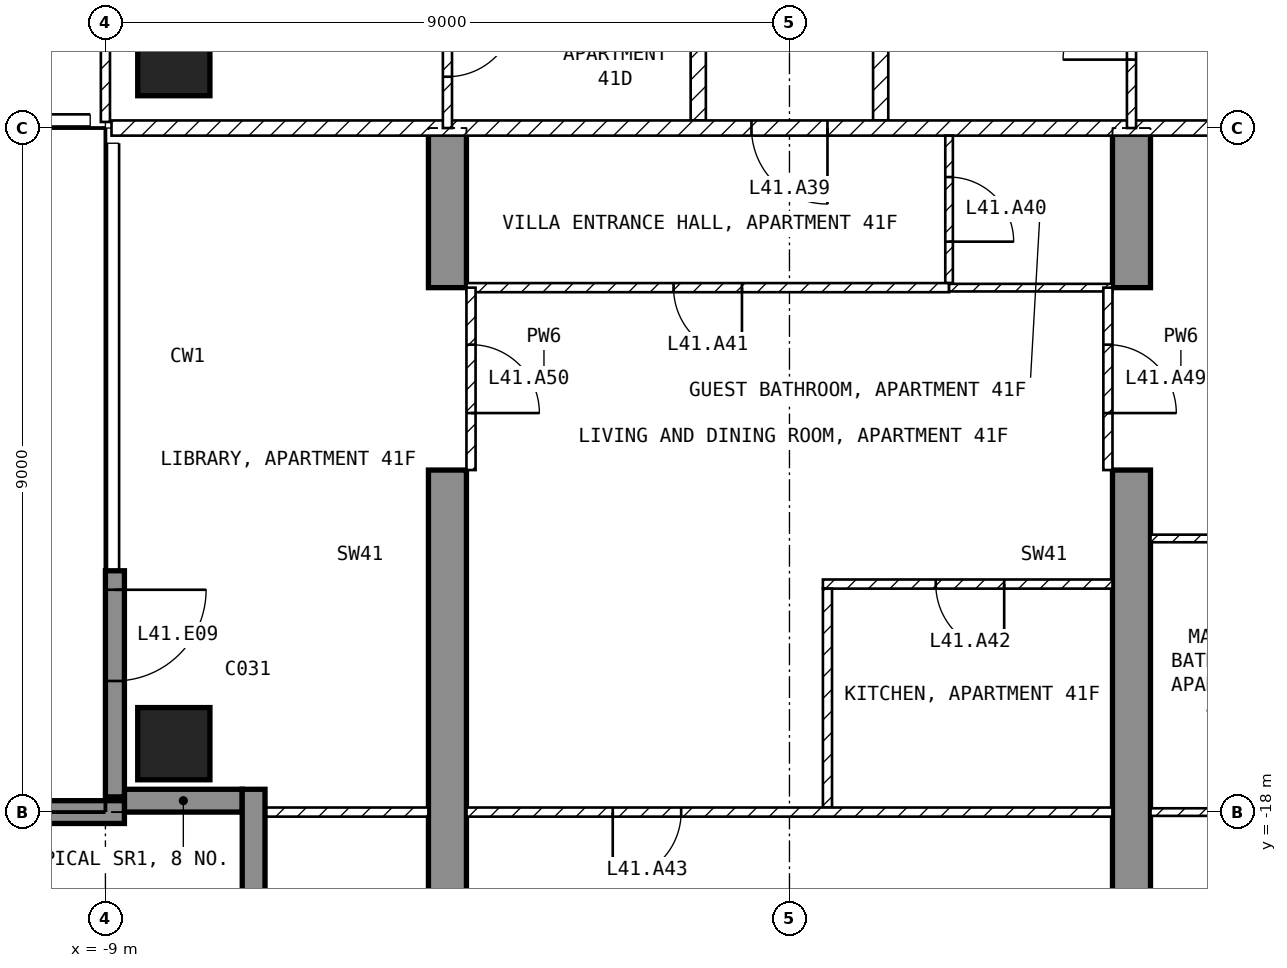
"""IFC4 building model, lengths in metres.
Left out: names, types, materials, properties, quantities, classifications, styles, units other than length and angle.
Written with IfcOpenShell. Run it as: python <this file> out.ifc"""

import sys

from ifc_helpers import new_model, si_unit, direction, frame, frame_2d, origin, origin_2d, place, context, subcontext, project, spatial, polyline, rectangle, outline, extrude, element, fill, save


model = new_model("IFC4")
c1 = context("Model", 3, precision=1e-05, world=origin(), true_north=direction((0.0, 1.0)))
c2 = subcontext(c1, "Body", "Model", "MODEL_VIEW")
j1 = project(units=[si_unit("LENGTHUNIT", "METRE"), si_unit("PLANEANGLEUNIT", "RADIAN")], contexts=[c1])
p1 = place(None, origin())
s1 = spatial("IfcSite", under=j1, at=p1, CompositionType="ELEMENT")
p2 = place(p1, origin())
s2 = spatial("IfcBuilding", under=s1, at=p2, CompositionType="ELEMENT")
p3 = place(p2, frame((0.0, 0.0, 170.1)))
s3 = spatial("IfcBuildingStorey", under=s2, at=p3, CompositionType="ELEMENT", Elevation=170.1)
for number, where, z_axis, x_axis in (
    (1, (-8.1, -17.1, -0.25), (0.0, 0.0, 1.0), (1.0, 0.0, 0.0)),
    (2, (-8.1, -8.1, -0.25), (0.0, 0.0, 1.0), (1.0, 0.0, 0.0)),
):
    element("IfcColumn", number, at=place(p3, frame(where, z_axis=z_axis, x_axis=x_axis)), inside=s3, PredefinedType="COLUMN", context=c2, shape_type="SweptSolid", body=[
        extrude(rectangle(XDim=0.95, YDim=0.95, at=origin_2d()), origin(), (0.0, 0.0, 1.0), 3.5),
    ])
for number, where, z_axis, x_axis in (
    (3, (-4.75, -20.225, -0.25), (1.0, 0.0, 0.0), (0.0, 1.0, 0.0)),
    (4, (4.25, -20.225, -0.25), (1.0, 0.0, 0.0), (0.0, 1.0, 0.0)),
):
    element("IfcWall", number, at=place(p3, frame(where, z_axis=z_axis, x_axis=x_axis)), inside=s3, PredefinedType="SHEAR", context=c2, shape_type="SweptSolid", body=[
        extrude(outline(polyline([(0.0, 0.0), (6.725, 0.0), (6.725, 2.65), (9.125, 2.65), (9.125, 0.0), (11.225, 0.0), (11.225, 3.5), (0.0, 3.5), (0.0, 0.0)])), origin(), (0.0, 0.0, 1.0), 0.5),
    ])
p4 = place(p3, frame((-8.875, -14.825, 0.0), z_axis=(0.0, 0.0, 1.0), x_axis=(0.0, -1.0, 0.0)))
e5 = element("IfcWall", 5, at=p4, inside=s3, PredefinedType="SOLIDWALL", context=c2, shape_type="SweptSolid", body=[
    extrude(rectangle(XDim=2.975, YDim=0.25, at=frame_2d((1.488, 0.0))), origin(), (0.0, 0.0, 1.0), 3.25),
])
p5 = place(p4, frame((0.25, 0.0, 0.0)))
e6 = element("IfcOpeningElement", 6, at=p5, cuts=e5, PredefinedType="OPENING", context=c2, shape_type="SweptSolid", body=[
    extrude(rectangle(XDim=1.2, YDim=2.4, at=frame_2d((0.6, 1.2))), frame((0.0, 0.135, 0.0), z_axis=(0.0, -1.0, 0.0), x_axis=(1.0, 0.0, 0.0)), (0.0, 0.0, 1.0), 0.27),
])
p6 = place(p3, frame((-8.75, -17.85, 0.0), z_axis=(0.0, 0.0, 1.0), x_axis=(1.0, 0.0, 0.0)))
e7 = element("IfcWall", 7, at=p6, inside=s3, PredefinedType="SOLIDWALL", context=c2, shape_type="SweptSolid", body=[
    extrude(rectangle(XDim=1.55, YDim=0.3, at=frame_2d((0.775, 0.0))), origin(), (0.0, 0.0, 1.0), 3.25),
])
p7 = place(p3, frame((-7.05, -17.7, 0.0), z_axis=(0.0, 0.0, 1.0), x_axis=(0.0, -1.0, 0.0)))
e8 = element("IfcWall", 8, at=p7, inside=s3, PredefinedType="SOLIDWALL", context=c2, shape_type="SweptSolid", body=[
    extrude(rectangle(XDim=1.8, YDim=0.3, at=frame_2d((0.9, 0.0))), origin(), (0.0, 0.0, 1.0), 3.25),
])
p8 = place(p3, frame((-8.75, -18.0, 0.0), z_axis=(0.0, 0.0, 1.0), x_axis=(-1.0, 0.0, 0.0)))
e9 = element("IfcWall", 9, at=p8, inside=s3, PredefinedType="SOLIDWALL", context=c2, shape_type="SweptSolid", body=[
    extrude(rectangle(XDim=2.95, YDim=0.3, at=frame_2d((1.475, 0.0))), origin(), (0.0, 0.0, 1.0), 3.25),
])
for number, where, z_axis, x_axis in (
    (10, (1.2, -4.6, 0.0), (0.0, 0.0, 1.0), (0.0, -1.0, 0.0)),
    (11, (-1.2, -8.9, 0.0), (0.0, 0.0, 1.0), (0.0, 1.0, 0.0)),
):
    element("IfcWall", number, at=place(p3, frame(where, z_axis=z_axis, x_axis=x_axis)), inside=s3, PredefinedType="PARTITIONING", context=c2, shape_type="SweptSolid", body=[
        extrude(rectangle(XDim=4.3, YDim=0.2, at=frame_2d((2.15, 0.0))), origin(), (0.0, 0.0, 1.0), 3.25),
    ])
p9 = place(p3, frame((8.92, -9.0, 0.0), z_axis=(0.0, 0.0, 1.0), x_axis=(-1.0, 0.0, 0.0)))
e12 = element("IfcWall", 12, at=p9, inside=s3, PredefinedType="PARTITIONING", context=c2, shape_type="SweptSolid", body=[
    extrude(rectangle(XDim=17.84, YDim=0.2, at=frame_2d((8.92, 0.0))), origin(), (0.0, 0.0, 1.0), 3.25),
])
p10 = place(p9, frame((8.42, 0.0, 0.0)))
e13 = element("IfcOpeningElement", 13, at=p10, cuts=e12, PredefinedType="OPENING", context=c2, shape_type="SweptSolid", body=[
    extrude(rectangle(XDim=1.0, YDim=2.1, at=frame_2d((0.5, 1.05))), frame((0.0, 0.11, 0.0), z_axis=(0.0, -1.0, 0.0), x_axis=(1.0, 0.0, 0.0)), (0.0, 0.0, 1.0), 0.22),
])
p11 = place(p3, frame((4.5, -9.0, 0.0), z_axis=(0.0, 0.0, 1.0), x_axis=(0.0, 1.0, 0.0)))
e14 = element("IfcWall", 14, at=p11, inside=s3, PredefinedType="PARTITIONING", context=c2, shape_type="SweptSolid", body=[
    extrude(rectangle(XDim=2.7, YDim=0.12, at=frame_2d((1.35, 0.0))), origin(), (0.0, 0.0, 1.0), 3.25),
])
p12 = place(p11, frame((0.9, 0.0, 0.0)))
e15 = element("IfcOpeningElement", 15, at=p12, cuts=e14, PredefinedType="OPENING", context=c2, shape_type="SweptSolid", body=[
    extrude(rectangle(XDim=0.9, YDim=2.1, at=frame_2d((0.45, 1.05))), frame((0.0, 0.07, 0.0), z_axis=(0.0, -1.0, 0.0), x_axis=(1.0, 0.0, 0.0)), (0.0, 0.0, 1.0), 0.14),
])
p13 = place(p3, frame((-9.0, -1.3, 0.0), z_axis=(0.0, 0.0, 1.0), x_axis=(0.0, -1.0, 0.0)))
e16 = element("IfcWall", 16, at=p13, inside=s3, PredefinedType="PARTITIONING", context=c2, shape_type="SweptSolid", body=[
    extrude(rectangle(XDim=7.62, YDim=0.12, at=frame_2d((3.81, 0.0))), origin(), (0.0, 0.0, 1.0), 3.25),
])
p14 = place(p13, frame((4.3, 0.0, 0.0)))
e17 = element("IfcOpeningElement", 17, at=p14, cuts=e16, PredefinedType="OPENING", context=c2, shape_type="SweptSolid", body=[
    extrude(rectangle(XDim=0.9, YDim=2.1, at=frame_2d((0.45, 1.05))), frame((0.0, 0.07, 0.0), z_axis=(0.0, -1.0, 0.0), x_axis=(1.0, 0.0, 0.0)), (0.0, 0.0, 1.0), 0.14),
])
p15 = place(p3, frame((-4.5, -6.75, 0.0), z_axis=(0.0, 0.0, 1.0), x_axis=(0.0, -1.0, 0.0)))
e18 = element("IfcWall", 18, at=p15, inside=s3, PredefinedType="PARTITIONING", context=c2, shape_type="SweptSolid", body=[
    extrude(rectangle(XDim=2.25, YDim=0.12, at=frame_2d((1.125, 0.0))), origin(), (0.0, 0.0, 1.0), 3.25),
])
p16 = place(p15, frame((0.675, 0.0, 0.0)))
e19 = element("IfcOpeningElement", 19, at=p16, cuts=e18, PredefinedType="OPENING", context=c2, shape_type="SweptSolid", body=[
    extrude(rectangle(XDim=0.9, YDim=2.1, at=frame_2d((0.45, 1.05))), frame((0.0, 0.07, 0.0), z_axis=(0.0, -1.0, 0.0), x_axis=(1.0, 0.0, 0.0)), (0.0, 0.0, 1.0), 0.14),
])
p17 = place(p3, frame((2.1, -9.1, 0.0), z_axis=(0.0, 0.0, 1.0), x_axis=(0.0, -1.0, 0.0)))
e20 = element("IfcWall", 20, at=p17, inside=s3, PredefinedType="PARTITIONING", context=c2, shape_type="SweptSolid", body=[
    extrude(rectangle(XDim=1.94, YDim=0.1, at=frame_2d((0.97, 0.0))), origin(), (0.0, 0.0, 1.0), 3.25),
])
p18 = place(p17, frame((0.545, 0.0, 0.0)))
e21 = element("IfcOpeningElement", 21, at=p18, cuts=e20, PredefinedType="OPENING", context=c2, shape_type="SweptSolid", body=[
    extrude(rectangle(XDim=0.85, YDim=2.1, at=frame_2d((0.425, 1.05))), frame((0.0, 0.06, 0.0), z_axis=(0.0, -1.0, 0.0), x_axis=(1.0, 0.0, 0.0)), (0.0, 0.0, 1.0), 0.12),
])
p19 = place(p3, frame((2.1, -11.1, 0.0), z_axis=(0.0, 0.0, 1.0), x_axis=(-1.0, 0.0, 0.0)))
e22 = element("IfcWall", 22, at=p19, inside=s3, PredefinedType="PARTITIONING", context=c2, shape_type="SweptSolid", body=[
    extrude(rectangle(XDim=6.35, YDim=0.12, at=frame_2d((3.175, 0.0))), origin(), (0.0, 0.0, 1.0), 3.25),
])
p20 = place(p19, frame((2.725, 0.0, 0.0)))
e23 = element("IfcOpeningElement", 23, at=p20, cuts=e22, PredefinedType="OPENING", context=c2, shape_type="SweptSolid", body=[
    extrude(rectangle(XDim=0.9, YDim=2.1, at=frame_2d((0.45, 1.05))), frame((0.0, 0.07, 0.0), z_axis=(0.0, -1.0, 0.0), x_axis=(1.0, 0.0, 0.0)), (0.0, 0.0, 1.0), 0.14),
])
p21 = place(p3, frame((4.25, -11.1, 0.0), z_axis=(0.0, 0.0, 1.0), x_axis=(-1.0, 0.0, 0.0)))
e24 = element("IfcWall", 24, at=p21, inside=s3, PredefinedType="PARTITIONING", context=c2, shape_type="SweptSolid", body=[
    extrude(rectangle(XDim=2.15, YDim=0.1, at=frame_2d((1.075, 0.0))), origin(), (0.0, 0.0, 1.0), 3.25),
])
p22 = place(p3, frame((4.25, -15.0, 0.0), z_axis=(0.0, 0.0, 1.0), x_axis=(-1.0, 0.0, 0.0)))
e25 = element("IfcWall", 25, at=p22, inside=s3, PredefinedType="PARTITIONING", context=c2, shape_type="SweptSolid", body=[
    extrude(rectangle(XDim=3.81, YDim=0.12, at=frame_2d((1.905, 0.0))), origin(), (0.0, 0.0, 1.0), 3.25),
])
p23 = place(p22, frame((1.425, 0.0, 0.0)))
e26 = element("IfcOpeningElement", 26, at=p23, cuts=e25, PredefinedType="OPENING", context=c2, shape_type="SweptSolid", body=[
    extrude(rectangle(XDim=0.9, YDim=2.1, at=frame_2d((0.45, 1.05))), frame((0.0, 0.07, 0.0), z_axis=(0.0, -1.0, 0.0), x_axis=(1.0, 0.0, 0.0)), (0.0, 0.0, 1.0), 0.14),
])
p24 = place(p3, frame((0.5, -15.06, 0.0), z_axis=(0.0, 0.0, 1.0), x_axis=(0.0, -1.0, 0.0)))
e27 = element("IfcWall", 27, at=p24, inside=s3, PredefinedType="PARTITIONING", context=c2, shape_type="SweptSolid", body=[
    extrude(rectangle(XDim=2.88, YDim=0.12, at=frame_2d((1.44, 0.0))), origin(), (0.0, 0.0, 1.0), 3.25),
])
p25 = place(p3, frame((4.25, -18.0, 0.0), z_axis=(0.0, 0.0, 1.0), x_axis=(-1.0, 0.0, 0.0)))
e28 = element("IfcWall", 28, at=p25, inside=s3, PredefinedType="PARTITIONING", context=c2, shape_type="SweptSolid", body=[
    extrude(rectangle(XDim=8.5, YDim=0.12, at=frame_2d((4.25, 0.0))), origin(), (0.0, 0.0, 1.0), 3.25),
])
p26 = place(p25, frame((5.675, 0.0, 0.0)))
e29 = element("IfcOpeningElement", 29, at=p26, cuts=e28, PredefinedType="OPENING", context=c2, shape_type="SweptSolid", body=[
    extrude(rectangle(XDim=0.9, YDim=2.1, at=frame_2d((0.45, 1.05))), frame((0.0, 0.07, 0.0), z_axis=(0.0, -1.0, 0.0), x_axis=(1.0, 0.0, 0.0)), (0.0, 0.0, 1.0), 0.14),
])
p27 = place(p3, frame((6.95, -14.4, 0.0), z_axis=(0.0, 0.0, 1.0), x_axis=(-1.0, 0.0, 0.0)))
e30 = element("IfcWall", 30, at=p27, inside=s3, PredefinedType="PARTITIONING", context=c2, shape_type="SweptSolid", body=[
    extrude(rectangle(XDim=2.2, YDim=0.1, at=frame_2d((1.1, 0.0))), origin(), (0.0, 0.0, 1.0), 3.25),
])
p28 = place(p3, frame((7.12, -18.0, 0.0), z_axis=(0.0, 0.0, 1.0), x_axis=(-1.0, 0.0, 0.0)))
e31 = element("IfcWall", 31, at=p28, inside=s3, PredefinedType="PARTITIONING", context=c2, shape_type="SweptSolid", body=[
    extrude(rectangle(XDim=2.37, YDim=0.1, at=frame_2d((1.185, 0.0))), origin(), (0.0, 0.0, 1.0), 3.25),
])
p29 = place(p3, frame((-4.75, -18.0, 0.0), z_axis=(0.0, 0.0, 1.0), x_axis=(-1.0, 0.0, 0.0)))
e32 = element("IfcWall", 32, at=p29, inside=s3, PredefinedType="PARTITIONING", context=c2, shape_type="SweptSolid", body=[
    extrude(rectangle(XDim=2.37, YDim=0.12, at=frame_2d((1.185, 0.0))), origin(), (0.0, 0.0, 1.0), 3.25),
])
p30 = place(p3, frame((4.19, -11.1, 0.0), z_axis=(0.0, 0.0, 1.0), x_axis=(0.0, -1.0, 0.0)))
e33 = element("IfcWall", 33, at=p30, inside=s3, PredefinedType="PARTITIONING", context=c2, shape_type="SweptSolid", body=[
    extrude(rectangle(XDim=2.4, YDim=0.12, at=frame_2d((1.2, 0.0))), origin(), (0.0, 0.0, 1.0), 2.4),
])
p31 = place(p30, frame((0.75, 0.0, 0.0)))
e34 = element("IfcOpeningElement", 34, at=p31, cuts=e33, PredefinedType="OPENING", context=c2, shape_type="SweptSolid", body=[
    extrude(rectangle(XDim=0.9, YDim=2.1, at=frame_2d((0.45, 1.05))), frame((0.0, 0.07, 0.0), z_axis=(0.0, -1.0, 0.0), x_axis=(1.0, 0.0, 0.0)), (0.0, 0.0, 1.0), 0.14),
])
p32 = place(p3, frame((-4.19, -11.1, 0.0), z_axis=(0.0, 0.0, 1.0), x_axis=(0.0, -1.0, 0.0)))
e35 = element("IfcWall", 35, at=p32, inside=s3, PredefinedType="PARTITIONING", context=c2, shape_type="SweptSolid", body=[
    extrude(rectangle(XDim=2.4, YDim=0.12, at=frame_2d((1.2, 0.0))), origin(), (0.0, 0.0, 1.0), 2.4),
])
p33 = place(p32, frame((0.75, 0.0, 0.0)))
e36 = element("IfcOpeningElement", 36, at=p33, cuts=e35, PredefinedType="OPENING", context=c2, shape_type="SweptSolid", body=[
    extrude(rectangle(XDim=0.9, YDim=2.1, at=frame_2d((0.45, 1.05))), frame((0.0, 0.07, 0.0), z_axis=(0.0, -1.0, 0.0), x_axis=(1.0, 0.0, 0.0)), (0.0, 0.0, 1.0), 0.14),
])
p34 = place(p5, origin())
e37 = element("IfcDoor", 37, at=p34, inside=s3, OperationType="SINGLE_SWING_LEFT", PredefinedType="DOOR", context=c2, shape_type="SweptSolid", body=[
    extrude(rectangle(XDim=1.2, YDim=2.4, at=frame_2d((0.6, 1.2))), frame((0.0, 0.025, 0.0), z_axis=(0.0, -1.0, 0.0), x_axis=(1.0, 0.0, 0.0)), (0.0, 0.0, 1.0), 0.05),
])
fill(e6, e37)
p35 = place(p12, origin())
e38 = element("IfcDoor", 38, at=p35, inside=s3, OperationType="SINGLE_SWING_LEFT", PredefinedType="DOOR", context=c2, shape_type="SweptSolid", body=[
    extrude(rectangle(XDim=0.9, YDim=2.1, at=frame_2d((0.45, 1.05))), frame((0.0, 0.025, 0.0), z_axis=(0.0, -1.0, 0.0), x_axis=(1.0, 0.0, 0.0)), (0.0, 0.0, 1.0), 0.05),
])
fill(e15, e38)
p36 = place(p16, origin())
e39 = element("IfcDoor", 39, at=p36, inside=s3, OperationType="SINGLE_SWING_LEFT", PredefinedType="DOOR", context=c2, shape_type="SweptSolid", body=[
    extrude(rectangle(XDim=0.9, YDim=2.1, at=frame_2d((0.45, 1.05))), frame((0.0, 0.025, 0.0), z_axis=(0.0, -1.0, 0.0), x_axis=(1.0, 0.0, 0.0)), (0.0, 0.0, 1.0), 0.05),
])
fill(e19, e39)
p37 = place(p10, origin())
e40 = element("IfcDoor", 40, at=p37, inside=s3, OperationType="SINGLE_SWING_LEFT", PredefinedType="DOOR", context=c2, shape_type="SweptSolid", body=[
    extrude(rectangle(XDim=1.0, YDim=2.1, at=frame_2d((0.5, 1.05))), frame((0.0, 0.025, 0.0), z_axis=(0.0, -1.0, 0.0), x_axis=(1.0, 0.0, 0.0)), (0.0, 0.0, 1.0), 0.05),
])
fill(e13, e40)
p38 = place(p18, origin())
e41 = element("IfcDoor", 41, at=p38, inside=s3, OperationType="SINGLE_SWING_RIGHT", PredefinedType="DOOR", context=c2, shape_type="SweptSolid", body=[
    extrude(rectangle(XDim=0.85, YDim=2.1, at=frame_2d((0.425, 1.05))), frame((0.0, 0.025, 0.0), z_axis=(0.0, -1.0, 0.0), x_axis=(1.0, 0.0, 0.0)), (0.0, 0.0, 1.0), 0.05),
])
fill(e21, e41)
p39 = place(p20, origin())
e42 = element("IfcDoor", 42, at=p39, inside=s3, OperationType="SINGLE_SWING_LEFT", PredefinedType="DOOR", context=c2, shape_type="SweptSolid", body=[
    extrude(rectangle(XDim=0.9, YDim=2.1, at=frame_2d((0.45, 1.05))), frame((0.0, 0.025, 0.0), z_axis=(0.0, -1.0, 0.0), x_axis=(1.0, 0.0, 0.0)), (0.0, 0.0, 1.0), 0.05),
])
fill(e23, e42)
p40 = place(p23, origin())
e43 = element("IfcDoor", 43, at=p40, inside=s3, OperationType="SINGLE_SWING_LEFT", PredefinedType="DOOR", context=c2, shape_type="SweptSolid", body=[
    extrude(rectangle(XDim=0.9, YDim=2.1, at=frame_2d((0.45, 1.05))), frame((0.0, 0.025, 0.0), z_axis=(0.0, -1.0, 0.0), x_axis=(1.0, 0.0, 0.0)), (0.0, 0.0, 1.0), 0.05),
])
fill(e26, e43)
p41 = place(p26, origin())
e44 = element("IfcDoor", 44, at=p41, inside=s3, OperationType="SINGLE_SWING_RIGHT", PredefinedType="DOOR", context=c2, shape_type="SweptSolid", body=[
    extrude(rectangle(XDim=0.9, YDim=2.1, at=frame_2d((0.45, 1.05))), frame((0.0, 0.025, 0.0), z_axis=(0.0, -1.0, 0.0), x_axis=(1.0, 0.0, 0.0)), (0.0, 0.0, 1.0), 0.05),
])
fill(e29, e44)
p42 = place(p31, origin())
e45 = element("IfcDoor", 45, at=p42, inside=s3, OperationType="SINGLE_SWING_RIGHT", PredefinedType="DOOR", context=c2, shape_type="SweptSolid", body=[
    extrude(rectangle(XDim=0.9, YDim=2.1, at=frame_2d((0.45, 1.05))), frame((0.0, 0.025, 0.0), z_axis=(0.0, -1.0, 0.0), x_axis=(1.0, 0.0, 0.0)), (0.0, 0.0, 1.0), 0.05),
])
fill(e34, e45)
p43 = place(p33, origin())
e46 = element("IfcDoor", 46, at=p43, inside=s3, OperationType="SINGLE_SWING_RIGHT", PredefinedType="DOOR", context=c2, shape_type="SweptSolid", body=[
    extrude(rectangle(XDim=0.9, YDim=2.1, at=frame_2d((0.45, 1.05))), frame((0.0, 0.025, 0.0), z_axis=(0.0, -1.0, 0.0), x_axis=(1.0, 0.0, 0.0)), (0.0, 0.0, 1.0), 0.05),
])
fill(e36, e46)
save(model, sys.argv[1])
